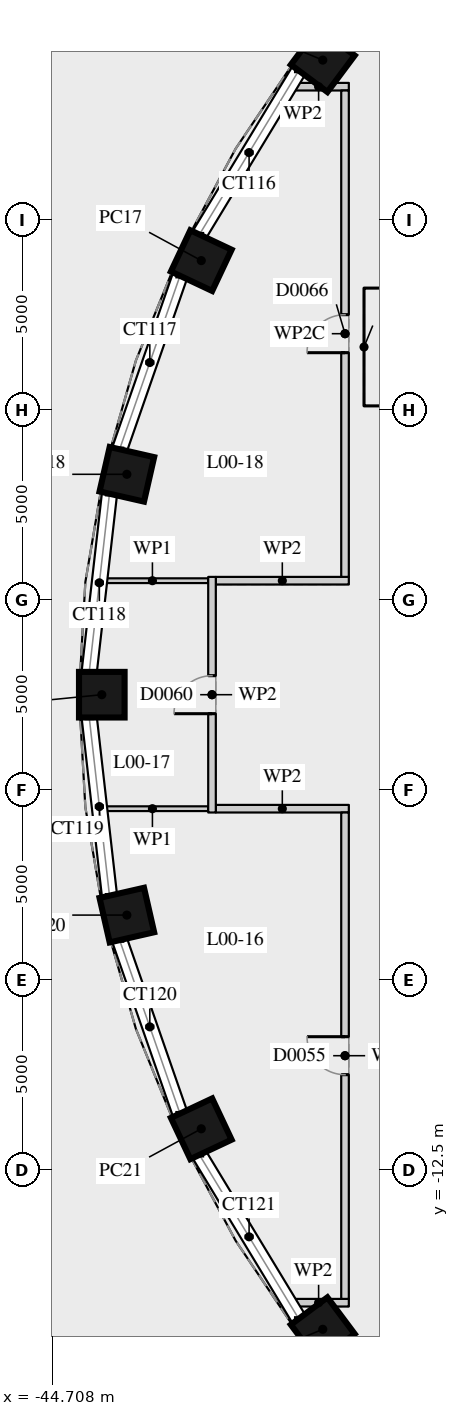
"""IFC4 building model, lengths in metres.
Left out: names, types, materials, properties, quantities, classifications, styles, units other than length and angle.
Written with IfcOpenShell. Run it as: python <this file> out.ifc"""

import sys

from ifc_helpers import new_model, si_unit, direction, frame, frame_2d, origin, origin_2d, place, context, subcontext, project, spatial, rectangle, extrude, element, fill, save


model = new_model("IFC4")
c1 = context("Model", 3, precision=1e-05, world=origin(), true_north=direction((0.0, 1.0)))
c2 = subcontext(c1, "Body", "Model", "MODEL_VIEW")
j1 = project(units=[si_unit("LENGTHUNIT", "METRE"), si_unit("PLANEANGLEUNIT", "RADIAN")], contexts=[c1])
p1 = place(None, origin())
s1 = spatial("IfcSite", under=j1, at=p1, CompositionType="ELEMENT")
p2 = place(p1, origin())
s2 = spatial("IfcBuilding", under=s1, at=p2, CompositionType="ELEMENT")
p3 = place(p2, origin())
s3 = spatial("IfcBuildingStorey", under=s2, at=p3, CompositionType="ELEMENT", Elevation=0.0)
for number, where, z_axis, x_axis in (
    (1, (-37.585, 16.7, 0.0), (0.0, 0.0, 1.0), (-0.801, 0.599, 0.0)),
    (2, (-40.783, 11.424, 0.0), (0.0, 0.0, 1.0), (-0.905, 0.426, 0.0)),
    (3, (-42.741, 5.8, 0.0), (0.0, 0.0, 1.0), (-0.975, 0.222, 0.0)),
    (4, (-43.4, 0.0, 0.0), (0.0, 0.0, 1.0), (-1.0, 0.0, 0.0)),
    (5, (-42.741, -5.8, 0.0), (0.0, 0.0, 1.0), (-0.975, -0.222, 0.0)),
    (6, (-40.783, -11.424, 0.0), (0.0, 0.0, 1.0), (-0.905, -0.426, 0.0)),
    (7, (-37.585, -16.7, 0.0), (0.0, 0.0, 1.0), (-0.801, -0.599, 0.0)),
):
    element("IfcColumn", number, at=place(p3, frame(where, z_axis=z_axis, x_axis=x_axis)), inside=s3, PredefinedType="COLUMN", context=c2, shape_type="SweptSolid", body=[
        extrude(rectangle(XDim=1.2, YDim=1.2, at=origin_2d()), origin(), (0.0, 0.0, 1.0), 7.5),
    ])
p4 = place(p3, frame((-38.49, -16.0, 0.0), z_axis=(0.0, 0.0, 1.0), x_axis=(1.0, 0.0, 0.0)))
e8 = element("IfcWall", 8, at=p4, inside=s3, PredefinedType="PARTITIONING", context=c2, shape_type="SweptSolid", body=[
    extrude(rectangle(XDim=1.59, YDim=0.2, at=frame_2d((0.795, 0.0))), origin(), (0.0, 0.0, 1.0), 7.09),
])
p5 = place(p3, frame((-43.536, -3.0, 0.0), z_axis=(0.0, 0.0, 1.0), x_axis=(1.0, 0.0, 0.0)))
e9 = element("IfcWall", 9, at=p5, inside=s3, PredefinedType="PARTITIONING", context=c2, shape_type="SweptSolid", body=[
    extrude(rectangle(XDim=2.936, YDim=0.125, at=frame_2d((1.468, 0.0))), origin(), (0.0, 0.0, 1.0), 7.09),
])
p6 = place(p3, frame((-40.4, -3.0, 0.0), z_axis=(0.0, 0.0, 1.0), x_axis=(1.0, 0.0, 0.0)))
e10 = element("IfcWall", 10, at=p6, inside=s3, PredefinedType="PARTITIONING", context=c2, shape_type="SweptSolid", body=[
    extrude(rectangle(XDim=3.5, YDim=0.2, at=frame_2d((1.75, 0.0))), origin(), (0.0, 0.0, 1.0), 7.09),
])
p7 = place(p3, frame((-43.536, 3.0, 0.0), z_axis=(0.0, 0.0, 1.0), x_axis=(1.0, 0.0, 0.0)))
e11 = element("IfcWall", 11, at=p7, inside=s3, PredefinedType="PARTITIONING", context=c2, shape_type="SweptSolid", body=[
    extrude(rectangle(XDim=2.936, YDim=0.125, at=frame_2d((1.468, 0.0))), origin(), (0.0, 0.0, 1.0), 7.09),
])
p8 = place(p3, frame((-40.4, 3.0, 0.0), z_axis=(0.0, 0.0, 1.0), x_axis=(1.0, 0.0, 0.0)))
e12 = element("IfcWall", 12, at=p8, inside=s3, PredefinedType="PARTITIONING", context=c2, shape_type="SweptSolid", body=[
    extrude(rectangle(XDim=3.5, YDim=0.2, at=frame_2d((1.75, 0.0))), origin(), (0.0, 0.0, 1.0), 7.09),
])
p9 = place(p3, frame((-38.49, 16.0, 0.0), z_axis=(0.0, 0.0, 1.0), x_axis=(1.0, 0.0, 0.0)))
e13 = element("IfcWall", 13, at=p9, inside=s3, PredefinedType="PARTITIONING", context=c2, shape_type="SweptSolid", body=[
    extrude(rectangle(XDim=1.59, YDim=0.2, at=frame_2d((0.795, 0.0))), origin(), (0.0, 0.0, 1.0), 7.09),
])
p10 = place(p3, frame((-40.5, -3.1, 0.0), z_axis=(0.0, 0.0, 1.0), x_axis=(0.0, 1.0, 0.0)))
e14 = element("IfcWall", 14, at=p10, inside=s3, PredefinedType="PARTITIONING", context=c2, shape_type="SweptSolid", body=[
    extrude(rectangle(XDim=6.2, YDim=0.2, at=frame_2d((3.1, 0.0))), origin(), (0.0, 0.0, 1.0), 7.09),
])
p11 = place(p10, frame((2.6, 0.0, 0.0)))
e15 = element("IfcOpeningElement", 15, at=p11, cuts=e14, PredefinedType="OPENING", context=c2, shape_type="SweptSolid", body=[
    extrude(rectangle(XDim=1.0, YDim=2.1, at=frame_2d((0.5, 1.05))), frame((0.0, 0.11, 0.0), z_axis=(0.0, -1.0, 0.0), x_axis=(1.0, 0.0, 0.0)), (0.0, 0.0, 1.0), 0.22),
])
p12 = place(p3, frame((-37.0, -15.9, 0.0), z_axis=(0.0, 0.0, 1.0), x_axis=(0.0, 1.0, 0.0)))
e16 = element("IfcWall", 16, at=p12, inside=s3, PredefinedType="PARTITIONING", context=c2, shape_type="SweptSolid", body=[
    extrude(rectangle(XDim=12.8, YDim=0.2, at=frame_2d((6.4, 0.0))), origin(), (0.0, 0.0, 1.0), 7.09),
])
p13 = place(p12, frame((5.9, 0.0, 0.0)))
e17 = element("IfcOpeningElement", 17, at=p13, cuts=e16, PredefinedType="OPENING", context=c2, shape_type="SweptSolid", body=[
    extrude(rectangle(XDim=1.0, YDim=2.1, at=frame_2d((0.5, 1.05))), frame((0.0, 0.11, 0.0), z_axis=(0.0, -1.0, 0.0), x_axis=(1.0, 0.0, 0.0)), (0.0, 0.0, 1.0), 0.22),
])
p14 = place(p3, frame((-37.0, 3.1, 0.0), z_axis=(0.0, 0.0, 1.0), x_axis=(0.0, 1.0, 0.0)))
e18 = element("IfcWall", 18, at=p14, inside=s3, PredefinedType="PARTITIONING", context=c2, shape_type="SweptSolid", body=[
    extrude(rectangle(XDim=12.8, YDim=0.2, at=frame_2d((6.4, 0.0))), origin(), (0.0, 0.0, 1.0), 6.19),
])
p15 = place(p14, frame((5.9, 0.0, 0.0)))
e19 = element("IfcOpeningElement", 19, at=p15, cuts=e18, PredefinedType="OPENING", context=c2, shape_type="SweptSolid", body=[
    extrude(rectangle(XDim=1.0, YDim=2.1, at=frame_2d((0.5, 1.05))), frame((0.0, 0.11, 0.0), z_axis=(0.0, -1.0, 0.0), x_axis=(1.0, 0.0, 0.0)), (0.0, 0.0, 1.0), 0.22),
])
p16 = place(p13, origin())
e20 = element("IfcDoor", 20, at=p16, inside=s3, OperationType="SINGLE_SWING_RIGHT", PredefinedType="DOOR", context=c2, shape_type="SweptSolid", body=[
    extrude(rectangle(XDim=1.0, YDim=2.1, at=frame_2d((0.5, 1.05))), frame((0.0, 0.025, 0.0), z_axis=(0.0, -1.0, 0.0), x_axis=(1.0, 0.0, 0.0)), (0.0, 0.0, 1.0), 0.05),
])
fill(e17, e20)
p17 = place(p11, origin())
e21 = element("IfcDoor", 21, at=p17, inside=s3, OperationType="SINGLE_SWING_LEFT", PredefinedType="DOOR", context=c2, shape_type="SweptSolid", body=[
    extrude(rectangle(XDim=1.0, YDim=2.1, at=frame_2d((0.5, 1.05))), frame((0.0, 0.025, 0.0), z_axis=(0.0, -1.0, 0.0), x_axis=(1.0, 0.0, 0.0)), (0.0, 0.0, 1.0), 0.05),
])
fill(e15, e21)
p18 = place(p15, origin())
e22 = element("IfcDoor", 22, at=p18, inside=s3, OperationType="SINGLE_SWING_LEFT", PredefinedType="DOOR", context=c2, shape_type="SweptSolid", body=[
    extrude(rectangle(XDim=1.0, YDim=2.1, at=frame_2d((0.5, 1.05))), frame((0.0, 0.025, 0.0), z_axis=(0.0, -1.0, 0.0), x_axis=(1.0, 0.0, 0.0)), (0.0, 0.0, 1.0), 0.05),
])
fill(e19, e22)
save(model, sys.argv[1])
